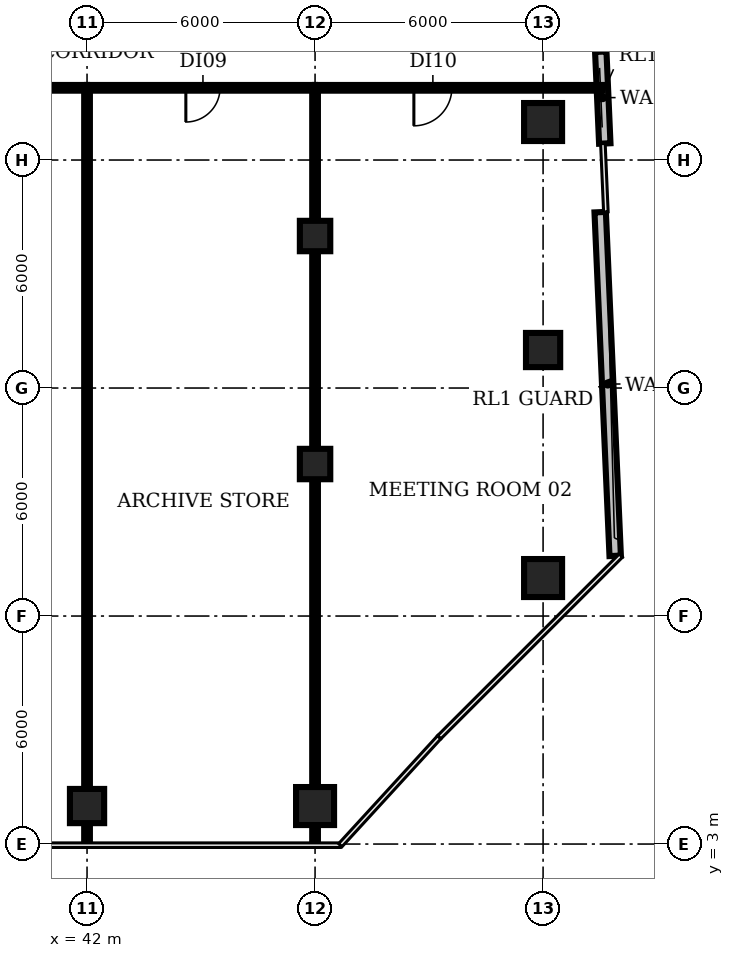
"""IFC4 building model, lengths in metres.
Left out: names, types, materials, properties, quantities, classifications, styles, units other than length and angle.
Written with IfcOpenShell. Run it as: python <this file> out.ifc"""

import sys

from ifc_helpers import new_model, si_unit, direction, frame, frame_2d, origin, origin_2d, place, context, subcontext, project, spatial, rectangle, circle, extrude, element, fill, save


model = new_model("IFC4")
c1 = context("Model", 3, precision=1e-05, world=origin(), true_north=direction((0.0, 1.0)))
c2 = subcontext(c1, "Body", "Model", "MODEL_VIEW")
j1 = project(units=[si_unit("LENGTHUNIT", "METRE"), si_unit("PLANEANGLEUNIT", "RADIAN")], contexts=[c1])
p1 = place(None, origin())
s1 = spatial("IfcSite", under=j1, at=p1, CompositionType="ELEMENT")
p2 = place(p1, origin())
s2 = spatial("IfcBuilding", under=s1, at=p2, CompositionType="ELEMENT")
p3 = place(p2, frame((0.0, 0.0, 100.4)))
s3 = spatial("IfcBuildingStorey", under=s2, at=p3, CompositionType="ELEMENT", Elevation=100.4)
p4 = place(p3, frame((42.0, 4.0, 0.0), z_axis=(0.0, 0.0, 1.0), x_axis=(1.0, 0.0, 0.0)))
e1 = element("IfcColumn", 1, at=p4, inside=s3, PredefinedType="COLUMN", context=c2, shape_type="SweptSolid", body=[
    extrude(rectangle(XDim=0.9, YDim=0.9, at=origin_2d()), origin(), (0.0, 0.0, 1.0), 3.85),
])
p5 = place(p3, frame((48.0, 4.0, 0.0), z_axis=(0.0, 0.0, 1.0), x_axis=(1.0, 0.0, 0.0)))
e2 = element("IfcColumn", 2, at=p5, inside=s3, PredefinedType="COLUMN", context=c2, shape_type="SweptSolid", body=[
    extrude(circle(Radius=0.5, at=origin_2d()), origin(), (0.0, 0.0, 1.0), 3.85),
])
for number, where, z_axis, x_axis in (
    (3, (48.0, 13.0, 0.0), (0.0, 0.0, 1.0), (1.0, 0.0, 0.0)),
    (4, (48.0, 19.0, 0.0), (0.0, 0.0, 1.0), (1.0, 0.0, 0.0)),
):
    element("IfcColumn", number, at=place(p3, frame(where, z_axis=z_axis, x_axis=x_axis)), inside=s3, PredefinedType="COLUMN", context=c2, shape_type="SweptSolid", body=[
        extrude(rectangle(XDim=0.8, YDim=0.8, at=origin_2d()), origin(), (0.0, 0.0, 1.0), 3.85),
    ])
p6 = place(p3, frame((54.0, 10.0, 0.0), z_axis=(0.0, 0.0, 1.0), x_axis=(1.0, 0.0, 0.0)))
e5 = element("IfcColumn", 5, at=p6, inside=s3, PredefinedType="COLUMN", context=c2, shape_type="SweptSolid", body=[
    extrude(circle(Radius=0.5, at=origin_2d()), origin(), (0.0, 0.0, 1.0), 3.85),
])
p7 = place(p3, frame((54.0, 16.0, 0.0), z_axis=(0.0, 0.0, 1.0), x_axis=(1.0, 0.0, 0.0)))
e6 = element("IfcColumn", 6, at=p7, inside=s3, PredefinedType="COLUMN", context=c2, shape_type="SweptSolid", body=[
    extrude(rectangle(XDim=0.9, YDim=0.9, at=origin_2d()), origin(), (0.0, 0.0, 1.0), 3.85),
])
p8 = place(p3, frame((54.0, 22.0, 0.0), z_axis=(0.0, 0.0, 1.0), x_axis=(1.0, 0.0, 0.0)))
e7 = element("IfcColumn", 7, at=p8, inside=s3, PredefinedType="COLUMN", context=c2, shape_type="SweptSolid", body=[
    extrude(circle(Radius=0.5, at=origin_2d()), origin(), (0.0, 0.0, 1.0), 3.85),
])
p9 = place(p3, frame((55.897, 10.584, 0.0), z_axis=(0.0, 0.0, 1.0), x_axis=(-0.043609267053, 0.999048663393, 0.0)))
e8 = element("IfcWall", 8, at=p9, inside=s3, PredefinedType="SOLIDWALL", context=c2, shape_type="SweptSolid", body=[
    extrude(rectangle(XDim=9.052, YDim=0.3, at=frame_2d((4.526, 0.0))), origin(), (0.0, 0.0, 1.0), 3.85),
])
p10 = place(p3, frame((55.623, 21.435, 0.0), z_axis=(0.0, 0.0, 1.0), x_axis=(-0.043625665955, 0.999047947433, 0.0)))
e9 = element("IfcWall", 9, at=p10, inside=s3, PredefinedType="SOLIDWALL", context=c2, shape_type="SweptSolid", body=[
    extrude(rectangle(XDim=2.417, YDim=0.3, at=frame_2d((1.209, 0.0))), origin(), (0.0, 0.0, 1.0), 3.85),
])
p11 = place(p3, frame((27.45, 22.9, 0.0), z_axis=(0.0, 0.0, 1.0), x_axis=(1.0, 0.0, 0.0)))
e10 = element("IfcWall", 10, at=p11, inside=s3, PredefinedType="PARTITIONING", context=c2, shape_type="SweptSolid", body=[
    extrude(rectangle(XDim=14.55, YDim=0.15, at=frame_2d((7.275, 0.0))), origin(), (0.0, 0.0, 1.0), 2.83),
])
for number, where, z_axis, x_axis in (
    (11, (42.0, 3.02, 0.0), (0.0, 0.0, 1.0), (0.0, 1.0, 0.0)),
    (12, (48.0, 3.02, 0.0), (0.0, 0.0, 1.0), (0.0, 1.0, 0.0)),
):
    element("IfcWall", number, at=place(p3, frame(where, z_axis=z_axis, x_axis=x_axis)), inside=s3, PredefinedType="PARTITIONING", context=c2, shape_type="SweptSolid", body=[
        extrude(rectangle(XDim=19.88, YDim=0.15, at=frame_2d((9.94, 0.0))), origin(), (0.0, 0.0, 1.0), 2.83),
    ])
p12 = place(p3, frame((48.0, 22.9, 0.0), z_axis=(0.0, 0.0, 1.0), x_axis=(-1.0, 0.0, 0.0)))
e13 = element("IfcWall", 13, at=p12, inside=s3, PredefinedType="PARTITIONING", context=c2, shape_type="SweptSolid", body=[
    extrude(rectangle(XDim=6.0, YDim=0.15, at=frame_2d((3.0, 0.0))), origin(), (0.0, 0.0, 1.0), 2.83),
])
p13 = place(p12, frame((2.5, 0.0, 0.0)))
e14 = element("IfcOpeningElement", 14, at=p13, cuts=e13, PredefinedType="OPENING", context=c2, shape_type="SweptSolid", body=[
    extrude(rectangle(XDim=0.9, YDim=2.1, at=frame_2d((0.45, 1.05))), frame((0.0, 0.085, 0.0), z_axis=(0.0, -1.0, 0.0), x_axis=(1.0, 0.0, 0.0)), (0.0, 0.0, 1.0), 0.17),
])
p14 = place(p3, frame((55.57, 22.9, 0.0), z_axis=(0.0, 0.0, 1.0), x_axis=(-1.0, 0.0, 0.0)))
e15 = element("IfcWall", 15, at=p14, inside=s3, PredefinedType="PARTITIONING", context=c2, shape_type="SweptSolid", body=[
    extrude(rectangle(XDim=7.57, YDim=0.15, at=frame_2d((3.785, 0.0))), origin(), (0.0, 0.0, 1.0), 2.83),
])
p15 = place(p14, frame((3.97, 0.0, 0.0)))
e16 = element("IfcOpeningElement", 16, at=p15, cuts=e15, PredefinedType="OPENING", context=c2, shape_type="SweptSolid", body=[
    extrude(rectangle(XDim=1.0, YDim=2.1, at=frame_2d((0.5, 1.05))), frame((0.0, 0.085, 0.0), z_axis=(0.0, -1.0, 0.0), x_axis=(1.0, 0.0, 0.0)), (0.0, 0.0, 1.0), 0.17),
])
p16 = place(p13, origin())
e17 = element("IfcDoor", 17, at=p16, inside=s3, OperationType="SINGLE_SWING_RIGHT", PredefinedType="DOOR", context=c2, shape_type="SweptSolid", body=[
    extrude(rectangle(XDim=0.9, YDim=2.1, at=frame_2d((0.45, 1.05))), frame((0.0, 0.025, 0.0), z_axis=(0.0, -1.0, 0.0), x_axis=(1.0, 0.0, 0.0)), (0.0, 0.0, 1.0), 0.05),
])
fill(e14, e17)
p17 = place(p15, origin())
e18 = element("IfcDoor", 18, at=p17, inside=s3, OperationType="SINGLE_SWING_RIGHT", PredefinedType="DOOR", context=c2, shape_type="SweptSolid", body=[
    extrude(rectangle(XDim=1.0, YDim=2.1, at=frame_2d((0.5, 1.05))), frame((0.0, 0.025, 0.0), z_axis=(0.0, -1.0, 0.0), x_axis=(1.0, 0.0, 0.0)), (0.0, 0.0, 1.0), 0.05),
])
fill(e16, e18)
save(model, sys.argv[1])
